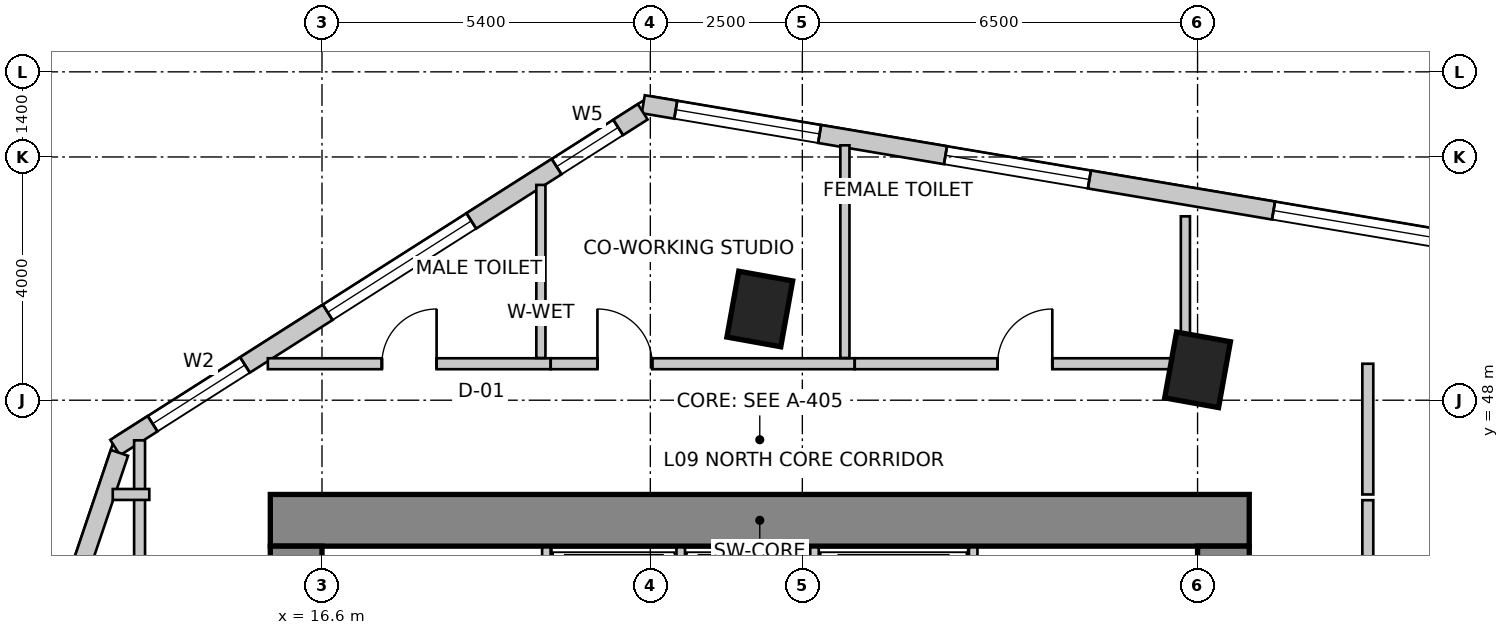
"""IFC4 building model, lengths in metres.
Left out: names, types, materials, properties, quantities, classifications, styles, units other than length and angle.
Written with IfcOpenShell. Run it as: python <this file> out.ifc"""

import sys

from ifc_helpers import new_model, si_unit, direction, frame, frame_2d, origin, origin_2d, place, context, subcontext, project, spatial, rectangle, extrude, source, transform, mapped, element, fill, save


model = new_model("IFC4")
c1 = context("Model", 3, precision=1e-05, world=origin(), true_north=direction((0.0, 1.0)))
c2 = subcontext(c1, "Body", "Model", "MODEL_VIEW")
j1 = project(units=[si_unit("LENGTHUNIT", "METRE"), si_unit("PLANEANGLEUNIT", "RADIAN")], contexts=[c1])
p1 = place(None, origin())
s1 = spatial("IfcSite", under=j1, at=p1, CompositionType="ELEMENT")
p2 = place(p1, origin())
s2 = spatial("IfcBuilding", under=s1, at=p2, CompositionType="ELEMENT")
p3 = place(p2, frame((0.0, 0.0, 39.0)))
s3 = spatial("IfcBuildingStorey", under=s2, at=p3, CompositionType="ELEMENT", Elevation=39.0)
p4 = place(p3, frame((15.75, 46.025, 0.0), z_axis=(0.0, 0.0, 1.0), x_axis=(1.0, 0.0, 0.0)))
e1 = element("IfcWall", 1, at=p4, inside=s3, PredefinedType="SHEAR", context=c2, shape_type="SweptSolid", body=[
    extrude(rectangle(XDim=16.1, YDim=0.85, at=frame_2d((8.05, 0.0))), origin(), (0.0, 0.0, 1.0), 4.0),
])
p5 = place(p3, frame((16.175, 34.2, 0.0), z_axis=(0.0, 0.0, 1.0), x_axis=(0.0, 1.0, 0.0)))
e2 = element("IfcWall", 2, at=p5, inside=s3, PredefinedType="SHEAR", context=c2, shape_type="SweptSolid", body=[
    extrude(rectangle(XDim=11.4, YDim=0.85, at=frame_2d((5.7, 0.0))), origin(), (0.0, 0.0, 1.0), 4.0),
])
m1 = source(origin(), c2, "Body", "SweptSolid", [
    extrude(rectangle(XDim=1.1, YDim=2.15, at=frame_2d((0.55, 1.075))), frame((0.0, 0.435, 0.0), z_axis=(0.0, -1.0, 0.0), x_axis=(1.0, 0.0, 0.0)), (0.0, 0.0, 1.0), 0.87),
])
p6 = place(p5, frame((7.15, 0.0, 0.0)))
e3 = element("IfcOpeningElement", 3, at=p6, cuts=e2, PredefinedType="OPENING", context=c2, shape_type="MappedRepresentation", body=[
    mapped(m1, transform((0.0, 0.0, 0.0), scale=1.0)),
])
p7 = place(p3, frame((31.425, 34.2, 0.0), z_axis=(0.0, 0.0, 1.0), x_axis=(0.0, 1.0, 0.0)))
e4 = element("IfcWall", 4, at=p7, inside=s3, PredefinedType="SHEAR", context=c2, shape_type="SweptSolid", body=[
    extrude(rectangle(XDim=11.4, YDim=0.85, at=frame_2d((5.7, 0.0))), origin(), (0.0, 0.0, 1.0), 4.0),
])
p8 = place(p7, frame((7.35, 0.0, 0.0)))
e5 = element("IfcOpeningElement", 5, at=p8, cuts=e4, PredefinedType="OPENING", context=c2, shape_type="MappedRepresentation", body=[
    mapped(m1, transform((0.0, 0.0, 0.0), scale=1.0)),
])
m2 = source(origin(), c2, "Body", "SweptSolid", [
    extrude(rectangle(XDim=0.9, YDim=1.1, at=origin_2d()), origin(), (0.0, 0.0, 1.0), 4.0),
])
for number, where, z_axis, x_axis in (
    (6, (23.8, 49.5, 0.0), (0.0, 0.0, 1.0), (0.984, -0.177, 0.0)),
    (7, (31.0, 48.5, 0.0), (0.0, 0.0, 1.0), (0.984, -0.177, 0.0)),
):
    element("IfcColumn", number, at=place(p3, frame(where, z_axis=z_axis, x_axis=x_axis)), inside=s3, PredefinedType="COLUMN", context=c2, shape_type="MappedRepresentation", body=[
        mapped(m2, transform((0.0, 0.0, 0.0), scale=1.0)),
    ])
p9 = place(p3, frame((58.761, 46.648, 0.0), z_axis=(0.0, 0.0, 1.0), x_axis=(-0.98607502735, 0.166301053624, 0.0)))
e8 = element("IfcWall", 8, at=p9, inside=s3, PredefinedType="SOLIDWALL", context=c2, shape_type="SweptSolid", body=[
    extrude(rectangle(XDim=37.397, YDim=0.3, at=frame_2d((18.699, 0.0))), origin(), (0.0, 0.0, 1.0), 3.75),
])
m3 = source(origin(), c2, "Body", "SweptSolid", [
    extrude(rectangle(XDim=2.1, YDim=2.0, at=frame_2d((1.05, 1.0))), frame((0.0, 0.16, 0.0), z_axis=(0.0, -1.0, 0.0), x_axis=(1.0, 0.0, 0.0)), (0.0, 0.0, 1.0), 0.32),
])
p10 = place(p9, frame((0.626, 0.0, 0.85)))
e9 = element("IfcOpeningElement", 9, at=p10, cuts=e8, PredefinedType="OPENING", context=c2, shape_type="MappedRepresentation", body=[
    mapped(m3, transform((0.0, 0.0, 0.0), scale=1.0)),
])
m4 = source(origin(), c2, "Body", "SweptSolid", [
    extrude(rectangle(XDim=2.4, YDim=2.2, at=frame_2d((1.2, 1.1))), frame((0.0, 0.16, 0.0), z_axis=(0.0, -1.0, 0.0), x_axis=(1.0, 0.0, 0.0)), (0.0, 0.0, 1.0), 0.32),
])
p11 = place(p9, frame((4.571, 0.0, 0.85)))
e10 = element("IfcOpeningElement", 10, at=p11, cuts=e8, PredefinedType="OPENING", context=c2, shape_type="MappedRepresentation", body=[
    mapped(m4, transform((0.0, 0.0, 0.0), scale=1.0)),
])
m5 = source(origin(), c2, "Body", "SweptSolid", [
    extrude(rectangle(XDim=2.8, YDim=2.4, at=frame_2d((1.4, 1.2))), frame((0.0, 0.16, 0.0), z_axis=(0.0, -1.0, 0.0), x_axis=(1.0, 0.0, 0.0)), (0.0, 0.0, 1.0), 0.32),
])
p12 = place(p9, frame((8.969, 0.0, 0.85)))
e11 = element("IfcOpeningElement", 11, at=p12, cuts=e8, PredefinedType="OPENING", context=c2, shape_type="MappedRepresentation", body=[
    mapped(m5, transform((0.0, 0.0, 0.0), scale=1.0)),
])
p13 = place(p9, frame((13.766, 0.0, 0.85)))
e12 = element("IfcOpeningElement", 12, at=p13, cuts=e8, PredefinedType="OPENING", context=c2, shape_type="MappedRepresentation", body=[
    mapped(m4, transform((0.0, 0.0, 0.0), scale=1.0)),
])
p14 = place(p9, frame((19.099, 0.0, 0.85)))
e13 = element("IfcOpeningElement", 13, at=p14, cuts=e8, PredefinedType="OPENING", context=c2, shape_type="MappedRepresentation", body=[
    mapped(m4, transform((0.0, 0.0, 0.0), scale=1.0)),
])
p15 = place(p9, frame((24.086, 0.0, 0.85)))
e14 = element("IfcOpeningElement", 14, at=p15, cuts=e8, PredefinedType="OPENING", context=c2, shape_type="MappedRepresentation", body=[
    mapped(m5, transform((0.0, 0.0, 0.0), scale=1.0)),
])
p16 = place(p9, frame((29.957, 0.0, 0.85)))
e15 = element("IfcOpeningElement", 15, at=p16, cuts=e8, PredefinedType="OPENING", context=c2, shape_type="MappedRepresentation", body=[
    mapped(m4, transform((0.0, 0.0, 0.0), scale=1.0)),
])
p17 = place(p9, frame((34.456, 0.0, 0.85)))
e16 = element("IfcOpeningElement", 16, at=p17, cuts=e8, PredefinedType="OPENING", context=c2, shape_type="MappedRepresentation", body=[
    mapped(m4, transform((0.0, 0.0, 0.0), scale=1.0)),
])
p18 = place(p3, frame((21.875, 52.743, 0.0), z_axis=(0.0, 0.0, 1.0), x_axis=(-0.843647802826, -0.536896996441, 0.0)))
e17 = element("IfcWall", 17, at=p18, inside=s3, PredefinedType="SOLIDWALL", context=c2, shape_type="SweptSolid", body=[
    extrude(rectangle(XDim=10.284, YDim=0.3, at=frame_2d((5.142, 0.0))), origin(), (0.0, 0.0, 1.0), 3.75),
])
m6 = source(origin(), c2, "Body", "SweptSolid", [
    extrude(rectangle(XDim=1.2, YDim=1.6, at=frame_2d((0.6, 0.8))), frame((0.0, 0.16, 0.0), z_axis=(0.0, -1.0, 0.0), x_axis=(1.0, 0.0, 0.0)), (0.0, 0.0, 1.0), 0.32),
])
p19 = place(p18, frame((0.479, 0.0, 0.85)))
e18 = element("IfcOpeningElement", 18, at=p19, cuts=e17, PredefinedType="OPENING", context=c2, shape_type="MappedRepresentation", body=[
    mapped(m6, transform((0.0, 0.0, 0.0), scale=1.0)),
])
p20 = place(p18, frame((3.342, 0.0, 0.85)))
e19 = element("IfcOpeningElement", 19, at=p20, cuts=e17, PredefinedType="OPENING", context=c2, shape_type="MappedRepresentation", body=[
    mapped(m5, transform((0.0, 0.0, 0.0), scale=1.0)),
])
m7 = source(origin(), c2, "Body", "SweptSolid", [
    extrude(rectangle(XDim=1.8, YDim=2.1, at=frame_2d((0.9, 1.05))), frame((0.0, 0.16, 0.0), z_axis=(0.0, -1.0, 0.0), x_axis=(1.0, 0.0, 0.0)), (0.0, 0.0, 1.0), 0.32),
])
p21 = place(p18, frame((7.754, 0.0, 0.85)))
e20 = element("IfcOpeningElement", 20, at=p21, cuts=e17, PredefinedType="OPENING", context=c2, shape_type="MappedRepresentation", body=[
    mapped(m7, transform((0.0, 0.0, 0.0), scale=1.0)),
])
p22 = place(p3, frame((13.269, 47.134, 0.0), z_axis=(0.0, 0.0, 1.0), x_axis=(-0.319920423265, -0.947444416722, 0.0)))
e21 = element("IfcWall", 21, at=p22, inside=s3, PredefinedType="SOLIDWALL", context=c2, shape_type="SweptSolid", body=[
    extrude(rectangle(XDim=16.135, YDim=0.3, at=frame_2d((8.067, 0.0))), origin(), (0.0, 0.0, 1.0), 3.75),
])
p23 = place(p22, frame((2.188, 0.0, 0.85)))
e22 = element("IfcOpeningElement", 22, at=p23, cuts=e21, PredefinedType="OPENING", context=c2, shape_type="MappedRepresentation", body=[
    mapped(m4, transform((0.0, 0.0, 0.0), scale=1.0)),
])
p24 = place(p22, frame((6.959, 0.0, 0.85)))
e23 = element("IfcOpeningElement", 23, at=p24, cuts=e21, PredefinedType="OPENING", context=c2, shape_type="MappedRepresentation", body=[
    mapped(m5, transform((0.0, 0.0, 0.0), scale=1.0)),
])
p25 = place(p22, frame((12.13, 0.0, 0.85)))
e24 = element("IfcOpeningElement", 24, at=p25, cuts=e21, PredefinedType="OPENING", context=c2, shape_type="MappedRepresentation", body=[
    mapped(m4, transform((0.0, 0.0, 0.0), scale=1.0)),
])
for number, where, z_axis, x_axis in (
    (25, (20.29, 43.28, 0.0), (0.0, 0.0, 1.0), (0.0, 1.0, 0.0)),
    (26, (27.31, 43.28, 0.0), (0.0, 0.0, 1.0), (0.0, 1.0, 0.0)),
):
    element("IfcWall", number, at=place(p3, frame(where, z_axis=z_axis, x_axis=x_axis)), inside=s3, PredefinedType="SOLIDWALL", context=c2, shape_type="SweptSolid", body=[
        extrude(rectangle(XDim=2.3, YDim=0.14, at=frame_2d((1.15, 0.0))), origin(), (0.0, 0.0, 1.0), 3.75),
    ])
for number, where, z_axis, x_axis in (
    (27, (22.5, 43.02, 0.0), (0.0, 0.0, 1.0), (0.0, 1.0, 0.0)),
    (28, (24.7, 43.02, 0.0), (0.0, 0.0, 1.0), (0.0, 1.0, 0.0)),
):
    element("IfcWall", number, at=place(p3, frame(where, z_axis=z_axis, x_axis=x_axis)), inside=s3, PredefinedType="SOLIDWALL", context=c2, shape_type="SweptSolid", body=[
        extrude(rectangle(XDim=2.56, YDim=0.14, at=frame_2d((1.28, 0.0))), origin(), (0.0, 0.0, 1.0), 3.75),
    ])
p26 = place(p3, frame((13.6, 33.444, 0.0), z_axis=(0.0, 0.0, 1.0), x_axis=(0.0, 1.0, 0.0)))
e29 = element("IfcWall", 29, at=p26, inside=s3, PredefinedType="PARTITIONING", context=c2, shape_type="SweptSolid", body=[
    extrude(rectangle(XDim=13.896, YDim=0.18, at=frame_2d((6.948, 0.0))), origin(), (0.0, 0.0, 1.0), 2.892),
])
m8 = source(origin(), c2, "Body", "SweptSolid", [
    extrude(rectangle(XDim=0.9, YDim=2.15, at=frame_2d((0.45, 1.075))), frame((0.0, 0.1, 0.0), z_axis=(0.0, -1.0, 0.0), x_axis=(1.0, 0.0, 0.0)), (0.0, 0.0, 1.0), 0.2),
])
p27 = place(p26, frame((4.144, 0.0, 0.0)))
e30 = element("IfcOpeningElement", 30, at=p27, cuts=e29, PredefinedType="OPENING", context=c2, shape_type="MappedRepresentation", body=[
    mapped(m8, transform((0.0, 0.0, 0.0), scale=1.0)),
])
p28 = place(p3, frame((13.76, 46.45, 0.0), z_axis=(0.0, 0.0, 1.0), x_axis=(-1.0, 0.0, 0.0)))
e31 = element("IfcWall", 31, at=p28, inside=s3, PredefinedType="PARTITIONING", context=c2, shape_type="SweptSolid", body=[
    extrude(rectangle(XDim=0.601, YDim=0.18, at=frame_2d((0.301, 0.0))), origin(), (0.0, 0.0, 1.0), 3.75),
])
p29 = place(p3, frame((15.71, 48.6, 0.0), z_axis=(0.0, 0.0, 1.0), x_axis=(1.0, 0.0, 0.0)))
e32 = element("IfcWall", 32, at=p29, inside=s3, PredefinedType="PARTITIONING", context=c2, shape_type="SweptSolid", body=[
    extrude(rectangle(XDim=4.65, YDim=0.18, at=frame_2d((2.325, 0.0))), origin(), (0.0, 0.0, 1.0), 3.75),
])
p30 = place(p29, frame((1.875, 0.0, 0.0)))
e33 = element("IfcOpeningElement", 33, at=p30, cuts=e32, PredefinedType="OPENING", context=c2, shape_type="MappedRepresentation", body=[
    mapped(m8, transform((0.0, 0.0, 0.0), scale=1.0)),
])
p31 = place(p3, frame((20.362, 48.6, 0.0), z_axis=(0.0, 0.0, 1.0), x_axis=(1.0, 0.0, 0.0)))
e34 = element("IfcWall", 34, at=p31, inside=s3, PredefinedType="PARTITIONING", context=c2, shape_type="SweptSolid", body=[
    extrude(rectangle(XDim=4.998, YDim=0.18, at=frame_2d((2.499, 0.0))), origin(), (0.0, 0.0, 1.0), 3.335),
])
p32 = place(p31, frame((0.768, 0.0, 0.0)))
e35 = element("IfcOpeningElement", 35, at=p32, cuts=e34, PredefinedType="OPENING", context=c2, shape_type="MappedRepresentation", body=[
    mapped(m8, transform((0.0, 0.0, 0.0), scale=1.0)),
])
p33 = place(p3, frame((25.362, 48.6, 0.0), z_axis=(0.0, 0.0, 1.0), x_axis=(1.0, 0.0, 0.0)))
e36 = element("IfcWall", 36, at=p33, inside=s3, PredefinedType="PARTITIONING", context=c2, shape_type="SweptSolid", body=[
    extrude(rectangle(XDim=5.598, YDim=0.18, at=frame_2d((2.799, 0.0))), origin(), (0.0, 0.0, 1.0), 2.892),
])
p34 = place(p33, frame((2.349, 0.0, 0.0)))
e37 = element("IfcOpeningElement", 37, at=p34, cuts=e36, PredefinedType="OPENING", context=c2, shape_type="MappedRepresentation", body=[
    mapped(m8, transform((0.0, 0.0, 0.0), scale=1.0)),
])
p35 = place(p3, frame((33.8, 48.6, 0.0), z_axis=(0.0, 0.0, 1.0), x_axis=(0.0, -1.0, 0.0)))
e38 = element("IfcWall", 38, at=p35, inside=s3, PredefinedType="PARTITIONING", context=c2, shape_type="SweptSolid", body=[
    extrude(rectangle(XDim=2.15, YDim=0.18, at=frame_2d((1.075, 0.0))), origin(), (0.0, 0.0, 1.0), 2.892),
])
p36 = place(p3, frame((33.8, 46.356, 0.0), z_axis=(0.0, 0.0, 1.0), x_axis=(0.0, -1.0, 0.0)))
e39 = element("IfcWall", 39, at=p36, inside=s3, PredefinedType="PARTITIONING", context=c2, shape_type="SweptSolid", body=[
    extrude(rectangle(XDim=3.716, YDim=0.18, at=frame_2d((1.858, 0.0))), origin(), (0.0, 0.0, 1.0), 3.188),
])
p37 = place(p3, frame((20.2, 51.54, 0.0), z_axis=(0.0, 0.0, 1.0), x_axis=(0.0, -1.0, 0.0)))
e40 = element("IfcWall", 40, at=p37, inside=s3, PredefinedType="PARTITIONING", context=c2, shape_type="SweptSolid", body=[
    extrude(rectangle(XDim=2.846, YDim=0.15, at=frame_2d((1.423, 0.0))), origin(), (0.0, 0.0, 1.0), 3.75),
])
p38 = place(p3, frame((25.2, 52.192, 0.0), z_axis=(0.0, 0.0, 1.0), x_axis=(0.0, -1.0, 0.0)))
e41 = element("IfcWall", 41, at=p38, inside=s3, PredefinedType="PARTITIONING", context=c2, shape_type="SweptSolid", body=[
    extrude(rectangle(XDim=3.498, YDim=0.15, at=frame_2d((1.749, 0.0))), origin(), (0.0, 0.0, 1.0), 2.892),
])
p39 = place(p3, frame((30.8, 51.024, 0.0), z_axis=(0.0, 0.0, 1.0), x_axis=(0.0, -1.0, 0.0)))
e42 = element("IfcWall", 42, at=p39, inside=s3, PredefinedType="PARTITIONING", context=c2, shape_type="SweptSolid", body=[
    extrude(rectangle(XDim=2.204, YDim=0.15, at=frame_2d((1.102, 0.0))), origin(), (0.0, 0.0, 1.0), 3.75),
])
m9 = source(origin(), c2, "Body", "SweptSolid", [
    extrude(rectangle(XDim=2.8, YDim=2.4, at=frame_2d((1.4, 1.2))), frame((0.0, -0.015, 0.0), z_axis=(0.0, -1.0, 0.0), x_axis=(1.0, 0.0, 0.0)), (0.0, 0.0, 1.0), 0.06),
])
p40 = place(p15, origin())
e43 = element("IfcWindow", 43, at=p40, inside=s3, PartitioningType="SINGLE_PANEL", PredefinedType="WINDOW", context=c2, shape_type="MappedRepresentation", body=[
    mapped(m9, transform((0.0, 0.0, 0.0), scale=1.0)),
])
fill(e14, e43)
m10 = source(origin(), c2, "Body", "SweptSolid", [
    extrude(rectangle(XDim=2.4, YDim=2.2, at=frame_2d((1.2, 1.1))), frame((0.0, -0.015, 0.0), z_axis=(0.0, -1.0, 0.0), x_axis=(1.0, 0.0, 0.0)), (0.0, 0.0, 1.0), 0.06),
])
p41 = place(p16, origin())
e44 = element("IfcWindow", 44, at=p41, inside=s3, PartitioningType="SINGLE_PANEL", PredefinedType="WINDOW", context=c2, shape_type="MappedRepresentation", body=[
    mapped(m10, transform((0.0, 0.0, 0.0), scale=1.0)),
])
fill(e15, e44)
p42 = place(p17, origin())
e45 = element("IfcWindow", 45, at=p42, inside=s3, PartitioningType="SINGLE_PANEL", PredefinedType="WINDOW", context=c2, shape_type="MappedRepresentation", body=[
    mapped(m10, transform((0.0, 0.0, 0.0), scale=1.0)),
])
fill(e16, e45)
m11 = source(origin(), c2, "Body", "SweptSolid", [
    extrude(rectangle(XDim=1.2, YDim=1.6, at=frame_2d((0.6, 0.8))), frame((0.0, -0.015, 0.0), z_axis=(0.0, -1.0, 0.0), x_axis=(1.0, 0.0, 0.0)), (0.0, 0.0, 1.0), 0.06),
])
p43 = place(p19, origin())
e46 = element("IfcWindow", 46, at=p43, inside=s3, PartitioningType="SINGLE_PANEL", PredefinedType="WINDOW", context=c2, shape_type="MappedRepresentation", body=[
    mapped(m11, transform((0.0, 0.0, 0.0), scale=1.0)),
])
fill(e18, e46)
p44 = place(p20, origin())
e47 = element("IfcWindow", 47, at=p44, inside=s3, PartitioningType="SINGLE_PANEL", PredefinedType="WINDOW", context=c2, shape_type="MappedRepresentation", body=[
    mapped(m9, transform((0.0, 0.0, 0.0), scale=1.0)),
])
fill(e19, e47)
m12 = source(origin(), c2, "Body", "SweptSolid", [
    extrude(rectangle(XDim=1.8, YDim=2.1, at=frame_2d((0.9, 1.05))), frame((0.0, -0.015, 0.0), z_axis=(0.0, -1.0, 0.0), x_axis=(1.0, 0.0, 0.0)), (0.0, 0.0, 1.0), 0.06),
])
p45 = place(p21, origin())
e48 = element("IfcWindow", 48, at=p45, inside=s3, PartitioningType="SINGLE_PANEL", PredefinedType="WINDOW", context=c2, shape_type="MappedRepresentation", body=[
    mapped(m12, transform((0.0, 0.0, 0.0), scale=1.0)),
])
fill(e20, e48)
m13 = source(origin(), c2, "Body", "SweptSolid", [
    extrude(rectangle(XDim=0.9, YDim=2.15, at=frame_2d((0.45, 1.075))), frame((0.0, 0.025, 0.0), z_axis=(0.0, -1.0, 0.0), x_axis=(1.0, 0.0, 0.0)), (0.0, 0.0, 1.0), 0.05),
])
p46 = place(p30, origin())
e49 = element("IfcDoor", 49, at=p46, inside=s3, OperationType="SINGLE_SWING_RIGHT", PredefinedType="DOOR", context=c2, shape_type="MappedRepresentation", body=[
    mapped(m13, transform((0.0, 0.0, 0.0), scale=1.0)),
])
fill(e33, e49)
p47 = place(p32, origin())
e50 = element("IfcDoor", 50, at=p47, inside=s3, OperationType="SINGLE_SWING_LEFT", PredefinedType="DOOR", context=c2, shape_type="MappedRepresentation", body=[
    mapped(m13, transform((0.0, 0.0, 0.0), scale=1.0)),
])
fill(e35, e50)
p48 = place(p34, origin())
e51 = element("IfcDoor", 51, at=p48, inside=s3, OperationType="SINGLE_SWING_RIGHT", PredefinedType="DOOR", context=c2, shape_type="MappedRepresentation", body=[
    mapped(m13, transform((0.0, 0.0, 0.0), scale=1.0)),
])
fill(e37, e51)
save(model, sys.argv[1])
